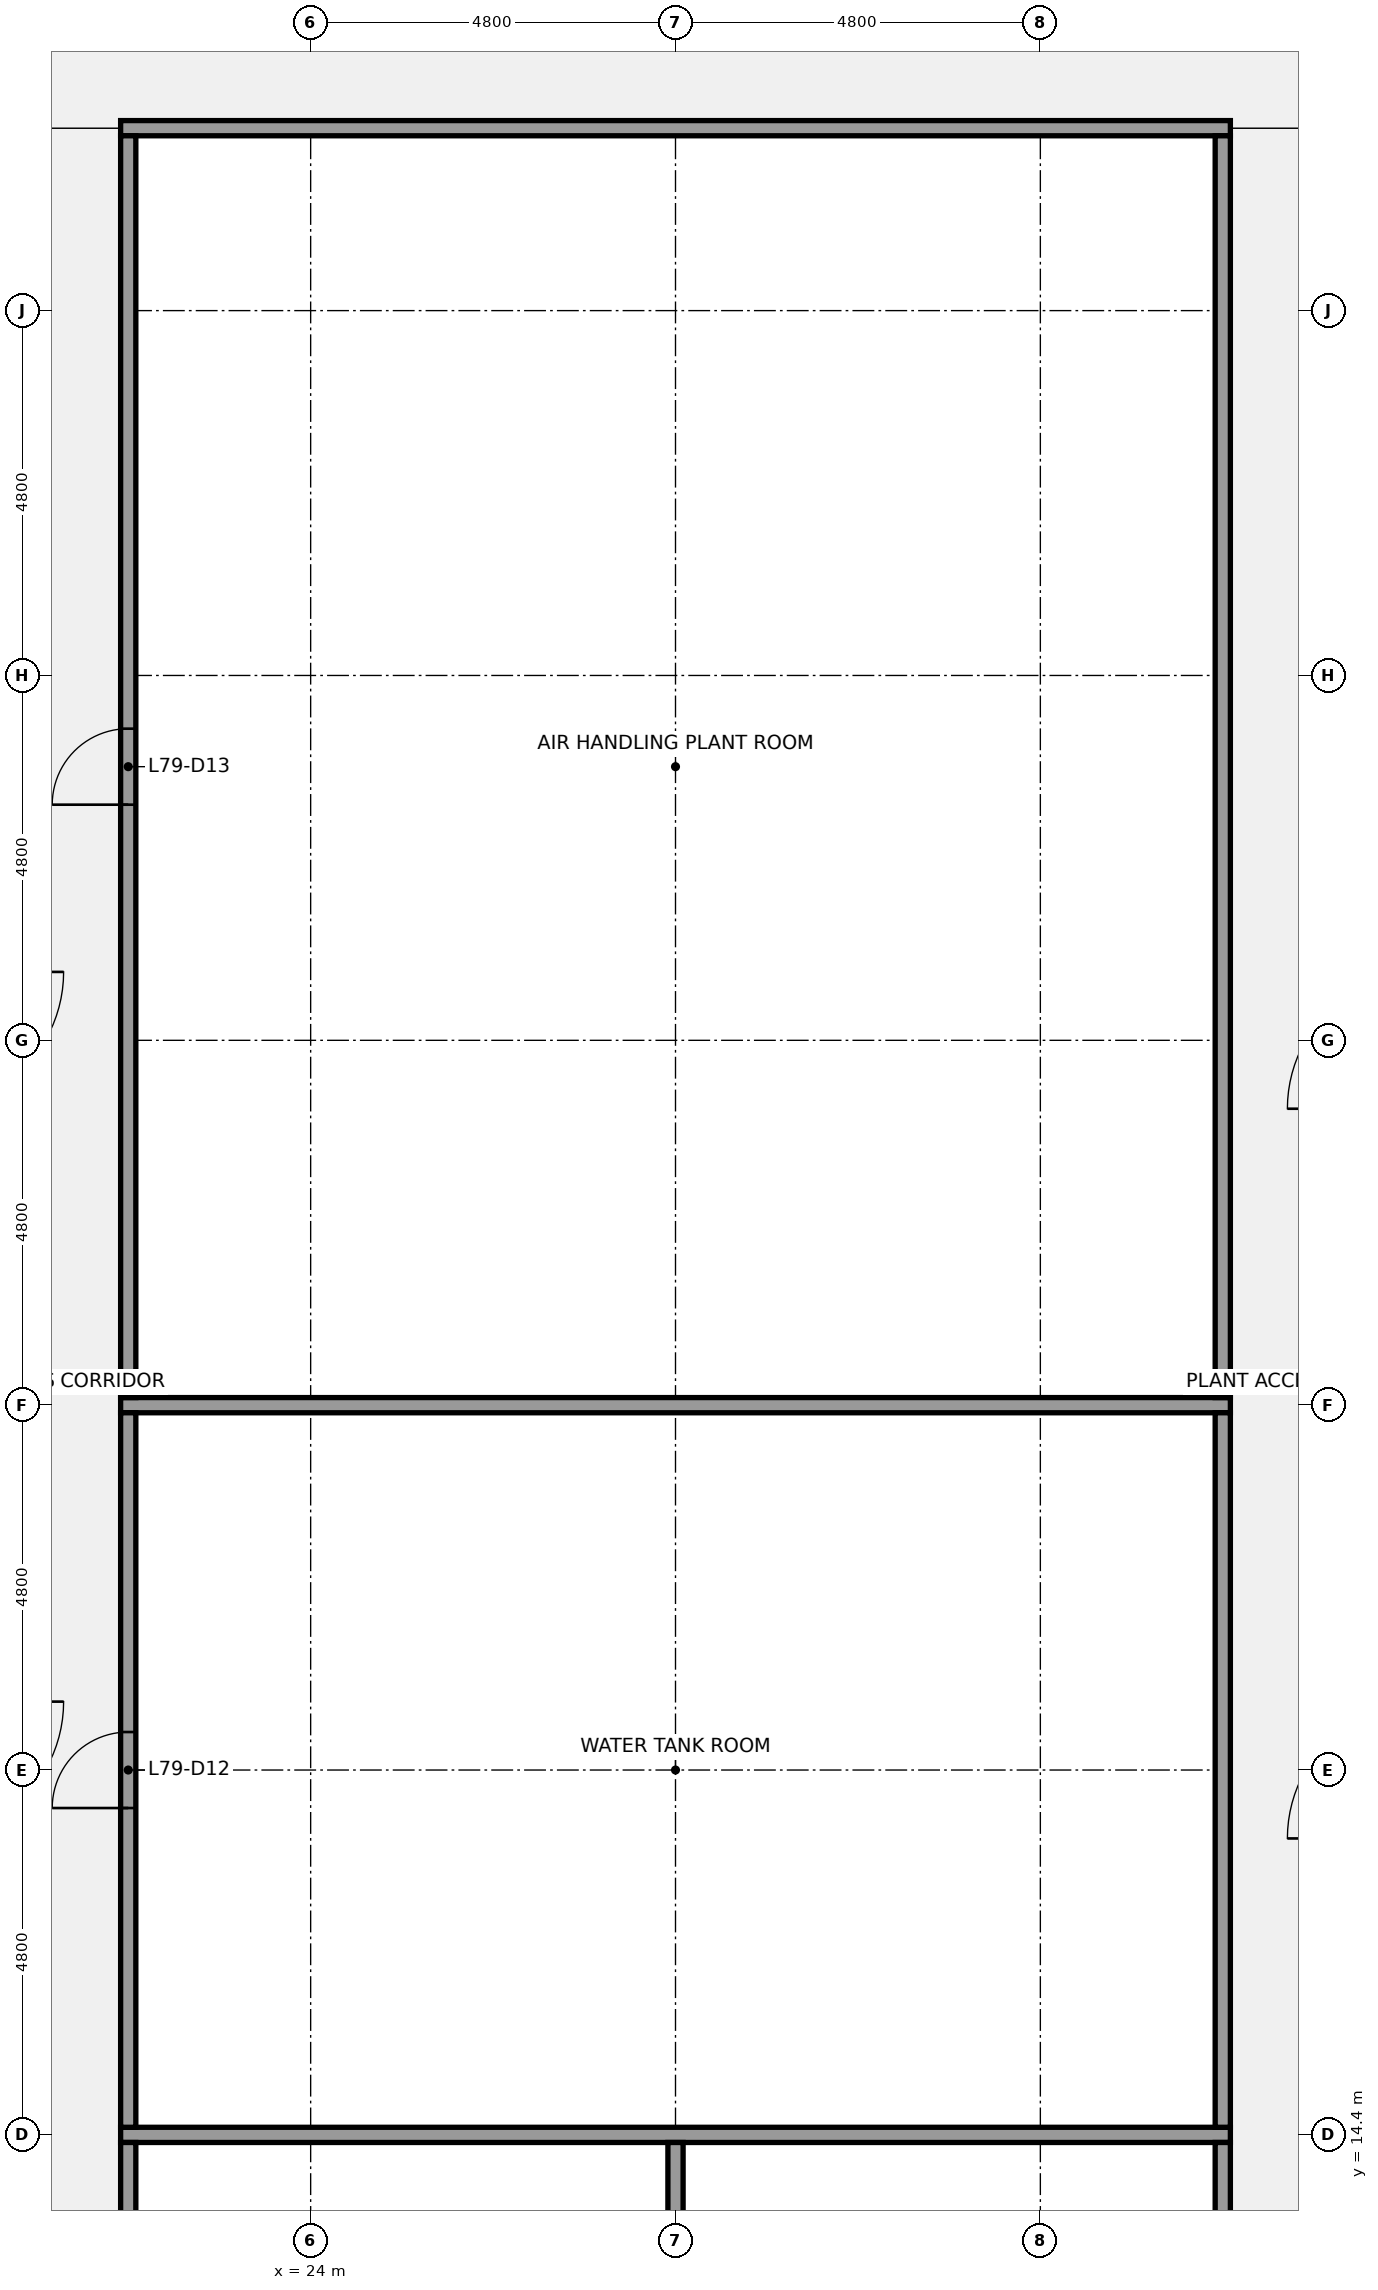
"""IFC4 building model, lengths in metres.
Left out: names, types, materials, properties, quantities, classifications, styles, units other than length and angle.
Written with IfcOpenShell. Run it as: python <this file> out.ifc"""

import sys

from ifc_helpers import new_model, si_unit, direction, frame, frame_2d, origin, place, context, subcontext, project, spatial, rectangle, extrude, element, fill, save


model = new_model("IFC4")
c1 = context("Model", 3, precision=1e-05, world=origin(), true_north=direction((0.0, 1.0)))
c2 = subcontext(c1, "Body", "Model", "MODEL_VIEW")
j1 = project(units=[si_unit("LENGTHUNIT", "METRE"), si_unit("PLANEANGLEUNIT", "RADIAN")], contexts=[c1])
p1 = place(None, origin())
s1 = spatial("IfcSite", under=j1, at=p1, CompositionType="ELEMENT")
p2 = place(p1, origin())
s2 = spatial("IfcBuilding", under=s1, at=p2, CompositionType="ELEMENT")
p3 = place(p2, frame((0.0, 0.0, 354.3)))
s3 = spatial("IfcBuildingStorey", under=s2, at=p3, CompositionType="ELEMENT", Elevation=354.3)
for number, where, z_axis, x_axis in (
    (1, (21.5, 14.4, 0.0), (0.0, 0.0, 1.0), (1.0, 0.0, 0.0)),
    (2, (21.5, 24.0, 0.0), (0.0, 0.0, 1.0), (1.0, 0.0, 0.0)),
    (3, (21.5, 40.8, 0.0), (0.0, 0.0, 1.0), (1.0, 0.0, 0.0)),
):
    element("IfcWall", number, at=place(p3, frame(where, z_axis=z_axis, x_axis=x_axis)), inside=s3, PredefinedType="PARTITIONING", context=c2, shape_type="SweptSolid", body=[
        extrude(rectangle(XDim=14.6, YDim=0.2, at=frame_2d((7.3, 0.0))), origin(), (0.0, 0.0, 1.0), 2.759),
    ])
p4 = place(p3, frame((21.6, 7.3, 0.0), z_axis=(0.0, 0.0, 1.0), x_axis=(0.0, 1.0, 0.0)))
e4 = element("IfcWall", 4, at=p4, inside=s3, PredefinedType="PARTITIONING", context=c2, shape_type="SweptSolid", body=[
    extrude(rectangle(XDim=7.0, YDim=0.2, at=frame_2d((3.5, 0.0))), origin(), (0.0, 0.0, 1.0), 2.759),
])
p5 = place(p4, frame((3.0, 0.0, 0.0)))
e5 = element("IfcOpeningElement", 5, at=p5, cuts=e4, PredefinedType="OPENING", context=c2, shape_type="SweptSolid", body=[
    extrude(rectangle(XDim=1.0, YDim=2.1, at=frame_2d((0.5, 1.05))), frame((0.0, 0.11, 0.0), z_axis=(0.0, -1.0, 0.0), x_axis=(1.0, 0.0, 0.0)), (0.0, 0.0, 1.0), 0.22),
])
p6 = place(p3, frame((21.6, 14.5, 0.0), z_axis=(0.0, 0.0, 1.0), x_axis=(0.0, 1.0, 0.0)))
e6 = element("IfcWall", 6, at=p6, inside=s3, PredefinedType="PARTITIONING", context=c2, shape_type="SweptSolid", body=[
    extrude(rectangle(XDim=9.4, YDim=0.2, at=frame_2d((4.7, 0.0))), origin(), (0.0, 0.0, 1.0), 2.759),
])
p7 = place(p6, frame((4.2, 0.0, 0.0)))
e7 = element("IfcOpeningElement", 7, at=p7, cuts=e6, PredefinedType="OPENING", context=c2, shape_type="SweptSolid", body=[
    extrude(rectangle(XDim=1.0, YDim=2.1, at=frame_2d((0.5, 1.05))), frame((0.0, 0.11, 0.0), z_axis=(0.0, -1.0, 0.0), x_axis=(1.0, 0.0, 0.0)), (0.0, 0.0, 1.0), 0.22),
])
p8 = place(p3, frame((21.6, 24.1, 0.0), z_axis=(0.0, 0.0, 1.0), x_axis=(0.0, 1.0, 0.0)))
e8 = element("IfcWall", 8, at=p8, inside=s3, PredefinedType="PARTITIONING", context=c2, shape_type="SweptSolid", body=[
    extrude(rectangle(XDim=16.6, YDim=0.2, at=frame_2d((8.3, 0.0))), origin(), (0.0, 0.0, 1.0), 2.759),
])
p9 = place(p8, frame((7.8, 0.0, 0.0)))
e9 = element("IfcOpeningElement", 9, at=p9, cuts=e8, PredefinedType="OPENING", context=c2, shape_type="SweptSolid", body=[
    extrude(rectangle(XDim=1.0, YDim=2.1, at=frame_2d((0.5, 1.05))), frame((0.0, 0.11, 0.0), z_axis=(0.0, -1.0, 0.0), x_axis=(1.0, 0.0, 0.0)), (0.0, 0.0, 1.0), 0.22),
])
p10 = place(p3, frame((28.8, 7.3, 0.0), z_axis=(0.0, 0.0, 1.0), x_axis=(0.0, 1.0, 0.0)))
e10 = element("IfcWall", 10, at=p10, inside=s3, PredefinedType="PARTITIONING", context=c2, shape_type="SweptSolid", body=[
    extrude(rectangle(XDim=7.0, YDim=0.2, at=frame_2d((3.5, 0.0))), origin(), (0.0, 0.0, 1.0), 2.759),
])
p11 = place(p3, frame((36.0, 7.3, 0.0), z_axis=(0.0, 0.0, 1.0), x_axis=(0.0, 1.0, 0.0)))
e11 = element("IfcWall", 11, at=p11, inside=s3, PredefinedType="PARTITIONING", context=c2, shape_type="SweptSolid", body=[
    extrude(rectangle(XDim=7.0, YDim=0.2, at=frame_2d((3.5, 0.0))), origin(), (0.0, 0.0, 1.0), 2.759),
])
p12 = place(p11, frame((3.0, 0.0, 0.0)))
e12 = element("IfcOpeningElement", 12, at=p12, cuts=e11, PredefinedType="OPENING", context=c2, shape_type="SweptSolid", body=[
    extrude(rectangle(XDim=1.0, YDim=2.1, at=frame_2d((0.5, 1.05))), frame((0.0, 0.11, 0.0), z_axis=(0.0, -1.0, 0.0), x_axis=(1.0, 0.0, 0.0)), (0.0, 0.0, 1.0), 0.22),
])
p13 = place(p3, frame((36.0, 14.5, 0.0), z_axis=(0.0, 0.0, 1.0), x_axis=(0.0, 1.0, 0.0)))
e13 = element("IfcWall", 13, at=p13, inside=s3, PredefinedType="PARTITIONING", context=c2, shape_type="SweptSolid", body=[
    extrude(rectangle(XDim=9.4, YDim=0.2, at=frame_2d((4.7, 0.0))), origin(), (0.0, 0.0, 1.0), 2.759),
])
p14 = place(p3, frame((36.0, 24.1, 0.0), z_axis=(0.0, 0.0, 1.0), x_axis=(0.0, 1.0, 0.0)))
e14 = element("IfcWall", 14, at=p14, inside=s3, PredefinedType="PARTITIONING", context=c2, shape_type="SweptSolid", body=[
    extrude(rectangle(XDim=16.6, YDim=0.2, at=frame_2d((8.3, 0.0))), origin(), (0.0, 0.0, 1.0), 2.759),
])
p15 = place(p7, origin())
e15 = element("IfcDoor", 15, at=p15, inside=s3, OperationType="SINGLE_SWING_LEFT", PredefinedType="DOOR", context=c2, shape_type="SweptSolid", body=[
    extrude(rectangle(XDim=1.0, YDim=2.1, at=frame_2d((0.5, 1.05))), frame((0.0, 0.025, 0.0), z_axis=(0.0, -1.0, 0.0), x_axis=(1.0, 0.0, 0.0)), (0.0, 0.0, 1.0), 0.05),
])
fill(e7, e15)
p16 = place(p9, origin())
e16 = element("IfcDoor", 16, at=p16, inside=s3, OperationType="SINGLE_SWING_LEFT", PredefinedType="DOOR", context=c2, shape_type="SweptSolid", body=[
    extrude(rectangle(XDim=1.0, YDim=2.1, at=frame_2d((0.5, 1.05))), frame((0.0, 0.025, 0.0), z_axis=(0.0, -1.0, 0.0), x_axis=(1.0, 0.0, 0.0)), (0.0, 0.0, 1.0), 0.05),
])
fill(e9, e16)
save(model, sys.argv[1])
